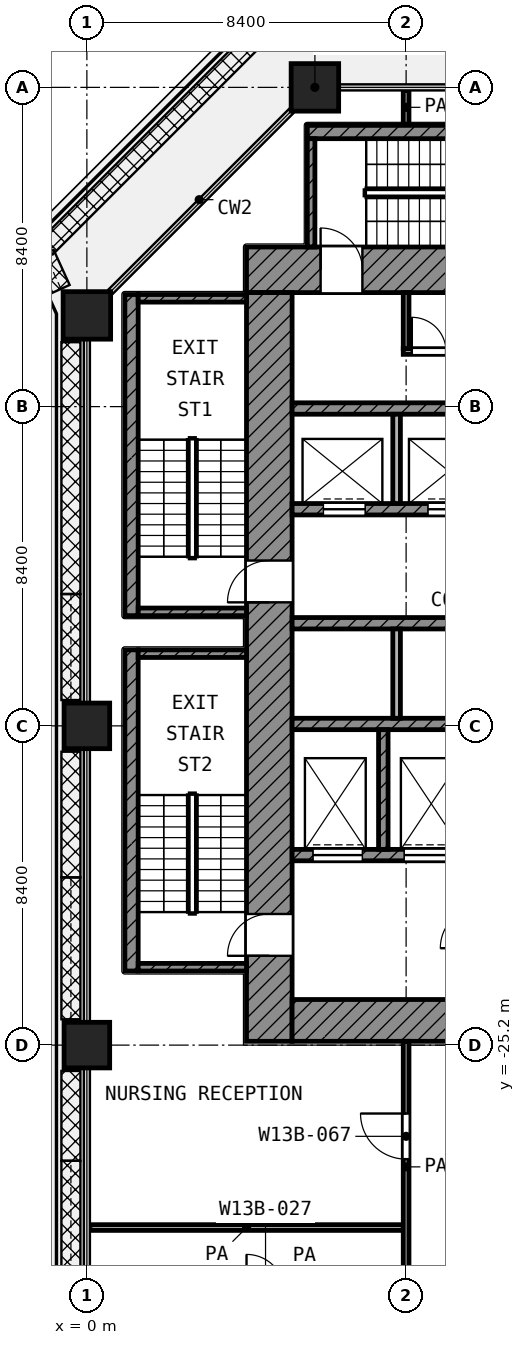
"""IFC4 building model, lengths in metres.
Left out: names, types, materials, properties, quantities, classifications, styles, units other than length and angle.
Written with IfcOpenShell. Run it as: python <this file> out.ifc"""

import sys

from ifc_helpers import new_model, si_unit, direction, frame, frame_2d, origin, origin_2d, place, context, subcontext, project, spatial, rectangle, extrude, element, fill, save


model = new_model("IFC4")
c1 = context("Model", 3, precision=1e-05, world=origin(), true_north=direction((0.0, 1.0)))
c2 = subcontext(c1, "Body", "Model", "MODEL_VIEW")
j1 = project(units=[si_unit("LENGTHUNIT", "METRE"), si_unit("PLANEANGLEUNIT", "RADIAN")], contexts=[c1])
p1 = place(None, origin())
s1 = spatial("IfcSite", under=j1, at=p1, CompositionType="ELEMENT")
p2 = place(p1, origin())
s2 = spatial("IfcBuilding", under=s1, at=p2, CompositionType="ELEMENT")
p3 = place(p2, frame((0.0, 0.0, 89.6)))
s3 = spatial("IfcBuildingStorey", under=s2, at=p3, CompositionType="ELEMENT", Elevation=89.6)
for number, where, z_axis, x_axis in (
    (1, (6.0, 0.0, 0.0), (0.0, 0.0, 1.0), (1.0, 0.0, 0.0)),
    (2, (0.0, -6.0, 0.0), (0.0, 0.0, 1.0), (1.0, 0.0, 0.0)),
):
    element("IfcColumn", number, at=place(p3, frame(where, z_axis=z_axis, x_axis=x_axis)), inside=s3, PredefinedType="COLUMN", context=c2, shape_type="SweptSolid", body=[
        extrude(rectangle(XDim=1.25, YDim=1.25, at=origin_2d()), origin(), (0.0, 0.0, 1.0), 4.2),
    ])
for number, where, z_axis, x_axis in (
    (3, (0.0, -16.8, 0.0), (0.0, 0.0, 1.0), (1.0, 0.0, 0.0)),
    (4, (0.0, -25.2, 0.0), (0.0, 0.0, 1.0), (1.0, 0.0, 0.0)),
):
    element("IfcColumn", number, at=place(p3, frame(where, z_axis=z_axis, x_axis=x_axis)), inside=s3, PredefinedType="COLUMN", context=c2, shape_type="SweptSolid", body=[
        extrude(rectangle(XDim=1.2, YDim=1.2, at=origin_2d()), origin(), (0.0, 0.0, 1.0), 4.2),
    ])
p4 = place(p3, frame((4.2, -4.8, 0.0), z_axis=(0.0, 0.0, 1.0), x_axis=(1.0, 0.0, 0.0)))
e5 = element("IfcWall", 5, at=p4, inside=s3, PredefinedType="SHEAR", context=c2, shape_type="SweptSolid", body=[
    extrude(rectangle(XDim=20.9, YDim=1.2, at=frame_2d((10.45, 0.0))), origin(), (0.0, 0.0, 1.0), 3.7),
])
p5 = place(p4, frame((1.95, 0.0, 0.0)))
e6 = element("IfcOpeningElement", 6, at=p5, cuts=e5, PredefinedType="OPENING", context=c2, shape_type="SweptSolid", body=[
    extrude(rectangle(XDim=1.1, YDim=2.1, at=frame_2d((0.55, 1.05))), frame((0.0, 0.61, 0.0), z_axis=(0.0, -1.0, 0.0), x_axis=(1.0, 0.0, 0.0)), (0.0, 0.0, 1.0), 1.22),
])
p6 = place(p4, frame((17.95, 0.0, 0.0)))
e7 = element("IfcOpeningElement", 7, at=p6, cuts=e5, PredefinedType="OPENING", context=c2, shape_type="SweptSolid", body=[
    extrude(rectangle(XDim=1.1, YDim=2.1, at=frame_2d((0.55, 1.05))), frame((0.0, 0.61, 0.0), z_axis=(0.0, -1.0, 0.0), x_axis=(1.0, 0.0, 0.0)), (0.0, 0.0, 1.0), 1.22),
])
p7 = place(p3, frame((4.8, -25.1, 0.0), z_axis=(0.0, 0.0, 1.0), x_axis=(0.0, 1.0, 0.0)))
e8 = element("IfcWall", 8, at=p7, inside=s3, PredefinedType="SHEAR", context=c2, shape_type="SweptSolid", body=[
    extrude(rectangle(XDim=19.7, YDim=1.2, at=frame_2d((9.85, 0.0))), origin(), (0.0, 0.0, 1.0), 3.7),
])
p8 = place(p7, frame((11.55, 0.0, 0.0)))
e9 = element("IfcOpeningElement", 9, at=p8, cuts=e8, PredefinedType="OPENING", context=c2, shape_type="SweptSolid", body=[
    extrude(rectangle(XDim=1.1, YDim=2.1, at=frame_2d((0.55, 1.05))), frame((0.0, 0.61, 0.0), z_axis=(0.0, -1.0, 0.0), x_axis=(1.0, 0.0, 0.0)), (0.0, 0.0, 1.0), 1.22),
])
p9 = place(p7, frame((2.25, 0.0, 0.0)))
e10 = element("IfcOpeningElement", 10, at=p9, cuts=e8, PredefinedType="OPENING", context=c2, shape_type="SweptSolid", body=[
    extrude(rectangle(XDim=1.1, YDim=2.1, at=frame_2d((0.55, 1.05))), frame((0.0, 0.61, 0.0), z_axis=(0.0, -1.0, 0.0), x_axis=(1.0, 0.0, 0.0)), (0.0, 0.0, 1.0), 1.22),
])
p10 = place(p3, frame((5.4, -24.55, 0.0), z_axis=(0.0, 0.0, 1.0), x_axis=(1.0, 0.0, 0.0)))
e11 = element("IfcWall", 11, at=p10, inside=s3, PredefinedType="SHEAR", context=c2, shape_type="SweptSolid", body=[
    extrude(rectangle(XDim=18.6, YDim=1.1, at=frame_2d((9.3, 0.0))), origin(), (0.0, 0.0, 1.0), 3.7),
])
p11 = place(p10, frame((6.3, 0.0, 0.0)))
e12 = element("IfcOpeningElement", 12, at=p11, cuts=e11, PredefinedType="OPENING", context=c2, shape_type="SweptSolid", body=[
    extrude(rectangle(XDim=1.8, YDim=2.1, at=frame_2d((0.9, 1.05))), frame((0.0, 0.56, 0.0), z_axis=(0.0, -1.0, 0.0), x_axis=(1.0, 0.0, 0.0)), (0.0, 0.0, 1.0), 1.12),
])
p12 = place(p3, frame((5.4, -8.45, 0.0), z_axis=(0.0, 0.0, 1.0), x_axis=(1.0, 0.0, 0.0)))
e13 = element("IfcWall", 13, at=p12, inside=s3, PredefinedType="SHEAR", context=c2, shape_type="SweptSolid", body=[
    extrude(rectangle(XDim=16.65, YDim=0.3, at=frame_2d((8.325, 0.0))), origin(), (0.0, 0.0, 1.0), 3.7),
])
p13 = place(p3, frame((5.4, -11.1, 0.0), z_axis=(0.0, 0.0, 1.0), x_axis=(1.0, 0.0, 0.0)))
e14 = element("IfcWall", 14, at=p13, inside=s3, PredefinedType="SHEAR", context=c2, shape_type="SweptSolid", body=[
    extrude(rectangle(XDim=16.65, YDim=0.3, at=frame_2d((8.325, 0.0))), origin(), (0.0, 0.0, 1.0), 3.7),
])
p14 = place(p13, frame((0.825, 0.0, 0.0)))
e15 = element("IfcOpeningElement", 15, at=p14, cuts=e14, PredefinedType="OPENING", context=c2, shape_type="SweptSolid", body=[
    extrude(rectangle(XDim=1.1, YDim=2.1, at=frame_2d((0.55, 1.05))), frame((0.0, 0.16, 0.0), z_axis=(0.0, -1.0, 0.0), x_axis=(1.0, 0.0, 0.0)), (0.0, 0.0, 1.0), 0.32),
])
p15 = place(p13, frame((3.575, 0.0, 0.0)))
e16 = element("IfcOpeningElement", 16, at=p15, cuts=e14, PredefinedType="OPENING", context=c2, shape_type="SweptSolid", body=[
    extrude(rectangle(XDim=1.1, YDim=2.1, at=frame_2d((0.55, 1.05))), frame((0.0, 0.16, 0.0), z_axis=(0.0, -1.0, 0.0), x_axis=(1.0, 0.0, 0.0)), (0.0, 0.0, 1.0), 0.32),
])
p16 = place(p13, frame((6.325, 0.0, 0.0)))
e17 = element("IfcOpeningElement", 17, at=p16, cuts=e14, PredefinedType="OPENING", context=c2, shape_type="SweptSolid", body=[
    extrude(rectangle(XDim=1.1, YDim=2.1, at=frame_2d((0.55, 1.05))), frame((0.0, 0.16, 0.0), z_axis=(0.0, -1.0, 0.0), x_axis=(1.0, 0.0, 0.0)), (0.0, 0.0, 1.0), 0.32),
])
p17 = place(p13, frame((9.075, 0.0, 0.0)))
e18 = element("IfcOpeningElement", 18, at=p17, cuts=e14, PredefinedType="OPENING", context=c2, shape_type="SweptSolid", body=[
    extrude(rectangle(XDim=1.1, YDim=2.1, at=frame_2d((0.55, 1.05))), frame((0.0, 0.16, 0.0), z_axis=(0.0, -1.0, 0.0), x_axis=(1.0, 0.0, 0.0)), (0.0, 0.0, 1.0), 0.32),
])
for number, where, z_axis, x_axis in (
    (19, (5.4, -14.1, 0.0), (0.0, 0.0, 1.0), (1.0, 0.0, 0.0)),
    (20, (5.4, -16.75, 0.0), (0.0, 0.0, 1.0), (1.0, 0.0, 0.0)),
):
    element("IfcWall", number, at=place(p3, frame(where, z_axis=z_axis, x_axis=x_axis)), inside=s3, PredefinedType="SHEAR", context=c2, shape_type="SweptSolid", body=[
        extrude(rectangle(XDim=16.65, YDim=0.3, at=frame_2d((8.325, 0.0))), origin(), (0.0, 0.0, 1.0), 3.7),
    ])
p18 = place(p3, frame((5.4, -20.2, 0.0), z_axis=(0.0, 0.0, 1.0), x_axis=(1.0, 0.0, 0.0)))
e21 = element("IfcWall", 21, at=p18, inside=s3, PredefinedType="SHEAR", context=c2, shape_type="SweptSolid", body=[
    extrude(rectangle(XDim=14.65, YDim=0.3, at=frame_2d((7.325, 0.0))), origin(), (0.0, 0.0, 1.0), 3.7),
])
p19 = place(p18, frame((10.55, 0.0, 0.0)))
e22 = element("IfcOpeningElement", 22, at=p19, cuts=e21, PredefinedType="OPENING", context=c2, shape_type="SweptSolid", body=[
    extrude(rectangle(XDim=1.3, YDim=2.1, at=frame_2d((0.65, 1.05))), frame((0.0, 0.16, 0.0), z_axis=(0.0, -1.0, 0.0), x_axis=(1.0, 0.0, 0.0)), (0.0, 0.0, 1.0), 0.32),
])
p20 = place(p18, frame((12.95, 0.0, 0.0)))
e23 = element("IfcOpeningElement", 23, at=p20, cuts=e21, PredefinedType="OPENING", context=c2, shape_type="SweptSolid", body=[
    extrude(rectangle(XDim=1.3, YDim=2.1, at=frame_2d((0.65, 1.05))), frame((0.0, 0.16, 0.0), z_axis=(0.0, -1.0, 0.0), x_axis=(1.0, 0.0, 0.0)), (0.0, 0.0, 1.0), 0.32),
])
p21 = place(p18, frame((0.55, 0.0, 0.0)))
e24 = element("IfcOpeningElement", 24, at=p21, cuts=e21, PredefinedType="OPENING", context=c2, shape_type="SweptSolid", body=[
    extrude(rectangle(XDim=1.3, YDim=2.1, at=frame_2d((0.65, 1.05))), frame((0.0, 0.16, 0.0), z_axis=(0.0, -1.0, 0.0), x_axis=(1.0, 0.0, 0.0)), (0.0, 0.0, 1.0), 0.32),
])
p22 = place(p18, frame((2.95, 0.0, 0.0)))
e25 = element("IfcOpeningElement", 25, at=p22, cuts=e21, PredefinedType="OPENING", context=c2, shape_type="SweptSolid", body=[
    extrude(rectangle(XDim=1.3, YDim=2.1, at=frame_2d((0.65, 1.05))), frame((0.0, 0.16, 0.0), z_axis=(0.0, -1.0, 0.0), x_axis=(1.0, 0.0, 0.0)), (0.0, 0.0, 1.0), 0.32),
])
p23 = place(p18, frame((5.95, 0.0, 0.0)))
e26 = element("IfcOpeningElement", 26, at=p23, cuts=e21, PredefinedType="OPENING", context=c2, shape_type="SweptSolid", body=[
    extrude(rectangle(XDim=0.9, YDim=2.1, at=frame_2d((0.45, 1.05))), frame((0.0, 0.16, 0.0), z_axis=(0.0, -1.0, 0.0), x_axis=(1.0, 0.0, 0.0)), (0.0, 0.0, 1.0), 0.32),
])
p24 = place(p18, frame((8.35, 0.0, 0.0)))
e27 = element("IfcOpeningElement", 27, at=p24, cuts=e21, PredefinedType="OPENING", context=c2, shape_type="SweptSolid", body=[
    extrude(rectangle(XDim=0.9, YDim=2.1, at=frame_2d((0.45, 1.05))), frame((0.0, 0.16, 0.0), z_axis=(0.0, -1.0, 0.0), x_axis=(1.0, 0.0, 0.0)), (0.0, 0.0, 1.0), 0.32),
])
p25 = place(p3, frame((7.8, -20.05, 0.0), z_axis=(0.0, 0.0, 1.0), x_axis=(0.0, 1.0, 0.0)))
e28 = element("IfcWall", 28, at=p25, inside=s3, PredefinedType="SHEAR", context=c2, shape_type="SweptSolid", body=[
    extrude(rectangle(XDim=3.15, YDim=0.25, at=frame_2d((1.575, 0.0))), origin(), (0.0, 0.0, 1.0), 3.7),
])
p26 = place(p3, frame((8.15, -10.95, 0.0), z_axis=(0.0, 0.0, 1.0), x_axis=(0.0, 1.0, 0.0)))
e29 = element("IfcWall", 29, at=p26, inside=s3, PredefinedType="PARTITIONING", context=c2, shape_type="SweptSolid", body=[
    extrude(rectangle(XDim=2.35, YDim=0.2, at=frame_2d((1.175, 0.0))), origin(), (0.0, 0.0, 1.0), 3.7),
])
p27 = place(p3, frame((8.15, -16.6, 0.0), z_axis=(0.0, 0.0, 1.0), x_axis=(0.0, 1.0, 0.0)))
e30 = element("IfcWall", 30, at=p27, inside=s3, PredefinedType="PARTITIONING", context=c2, shape_type="SweptSolid", body=[
    extrude(rectangle(XDim=2.35, YDim=0.2, at=frame_2d((1.175, 0.0))), origin(), (0.0, 0.0, 1.0), 3.7),
])
p28 = place(p3, frame((8.325, -6.95, 0.0), z_axis=(0.0, 0.0, 1.0), x_axis=(1.0, 0.0, 0.0)))
e31 = element("IfcWall", 31, at=p28, inside=s3, PredefinedType="PARTITIONING", context=c2, shape_type="SweptSolid", body=[
    extrude(rectangle(XDim=12.75, YDim=0.15, at=frame_2d((6.375, 0.0))), origin(), (0.0, 0.0, 1.0), 3.7),
])
p29 = place(p28, frame((0.225, 0.0, 0.0)))
e32 = element("IfcOpeningElement", 32, at=p29, cuts=e31, PredefinedType="OPENING", context=c2, shape_type="SweptSolid", body=[
    extrude(rectangle(XDim=0.9, YDim=2.1, at=frame_2d((0.45, 1.05))), frame((0.0, 0.085, 0.0), z_axis=(0.0, -1.0, 0.0), x_axis=(1.0, 0.0, 0.0)), (0.0, 0.0, 1.0), 0.17),
])
p30 = place(p28, frame((2.025, 0.0, 0.0)))
e33 = element("IfcOpeningElement", 33, at=p30, cuts=e31, PredefinedType="OPENING", context=c2, shape_type="SweptSolid", body=[
    extrude(rectangle(XDim=0.9, YDim=2.1, at=frame_2d((0.45, 1.05))), frame((0.0, 0.085, 0.0), z_axis=(0.0, -1.0, 0.0), x_axis=(1.0, 0.0, 0.0)), (0.0, 0.0, 1.0), 0.17),
])
p31 = place(p28, frame((4.125, 0.0, 0.0)))
e34 = element("IfcOpeningElement", 34, at=p31, cuts=e31, PredefinedType="OPENING", context=c2, shape_type="SweptSolid", body=[
    extrude(rectangle(XDim=0.9, YDim=2.1, at=frame_2d((0.45, 1.05))), frame((0.0, 0.085, 0.0), z_axis=(0.0, -1.0, 0.0), x_axis=(1.0, 0.0, 0.0)), (0.0, 0.0, 1.0), 0.17),
])
p32 = place(p28, frame((5.625, 0.0, 0.0)))
e35 = element("IfcOpeningElement", 35, at=p32, cuts=e31, PredefinedType="OPENING", context=c2, shape_type="SweptSolid", body=[
    extrude(rectangle(XDim=0.9, YDim=2.1, at=frame_2d((0.45, 1.05))), frame((0.0, 0.085, 0.0), z_axis=(0.0, -1.0, 0.0), x_axis=(1.0, 0.0, 0.0)), (0.0, 0.0, 1.0), 0.17),
])
p33 = place(p28, frame((7.425, 0.0, 0.0)))
e36 = element("IfcOpeningElement", 36, at=p33, cuts=e31, PredefinedType="OPENING", context=c2, shape_type="SweptSolid", body=[
    extrude(rectangle(XDim=0.9, YDim=2.1, at=frame_2d((0.45, 1.05))), frame((0.0, 0.085, 0.0), z_axis=(0.0, -1.0, 0.0), x_axis=(1.0, 0.0, 0.0)), (0.0, 0.0, 1.0), 0.17),
])
p34 = place(p28, frame((9.225, 0.0, 0.0)))
e37 = element("IfcOpeningElement", 37, at=p34, cuts=e31, PredefinedType="OPENING", context=c2, shape_type="SweptSolid", body=[
    extrude(rectangle(XDim=0.9, YDim=2.1, at=frame_2d((0.45, 1.05))), frame((0.0, 0.085, 0.0), z_axis=(0.0, -1.0, 0.0), x_axis=(1.0, 0.0, 0.0)), (0.0, 0.0, 1.0), 0.17),
])
p35 = place(p28, frame((11.025, 0.0, 0.0)))
e38 = element("IfcOpeningElement", 38, at=p35, cuts=e31, PredefinedType="OPENING", context=c2, shape_type="SweptSolid", body=[
    extrude(rectangle(XDim=0.9, YDim=2.1, at=frame_2d((0.45, 1.05))), frame((0.0, 0.085, 0.0), z_axis=(0.0, -1.0, 0.0), x_axis=(1.0, 0.0, 0.0)), (0.0, 0.0, 1.0), 0.17),
])
p36 = place(p3, frame((8.4, -6.875, 0.0), z_axis=(0.0, 0.0, 1.0), x_axis=(0.0, 1.0, 0.0)))
e39 = element("IfcWall", 39, at=p36, inside=s3, PredefinedType="PARTITIONING", context=c2, shape_type="SweptSolid", body=[
    extrude(rectangle(XDim=1.475, YDim=0.15, at=frame_2d((0.738, 0.0))), origin(), (0.0, 0.0, 1.0), 3.7),
])
p37 = place(p3, frame((1.175, -13.9, 0.0), z_axis=(0.0, 0.0, 1.0), x_axis=(0.0, 1.0, 0.0)))
e40 = element("IfcWall", 40, at=p37, inside=s3, PredefinedType="SHEAR", context=c2, shape_type="SweptSolid", body=[
    extrude(rectangle(XDim=8.45, YDim=0.35, at=frame_2d((4.225, 0.0))), origin(), (0.0, 0.0, 1.0), 3.7),
])
for number, where, z_axis, x_axis in (
    (41, (1.35, -5.55, 0.0), (0.0, 0.0, 1.0), (1.0, 0.0, 0.0)),
    (42, (1.35, -13.8, 0.0), (0.0, 0.0, 1.0), (1.0, 0.0, 0.0)),
):
    element("IfcWall", number, at=place(p3, frame(where, z_axis=z_axis, x_axis=x_axis)), inside=s3, PredefinedType="SHEAR", context=c2, shape_type="SweptSolid", body=[
        extrude(rectangle(XDim=2.85, YDim=0.2, at=frame_2d((1.425, 0.0))), origin(), (0.0, 0.0, 1.0), 3.7),
    ])
p38 = place(p3, frame((1.175, -23.25, 0.0), z_axis=(0.0, 0.0, 1.0), x_axis=(0.0, 1.0, 0.0)))
e43 = element("IfcWall", 43, at=p38, inside=s3, PredefinedType="SHEAR", context=c2, shape_type="SweptSolid", body=[
    extrude(rectangle(XDim=8.45, YDim=0.35, at=frame_2d((4.225, 0.0))), origin(), (0.0, 0.0, 1.0), 3.7),
])
for number, where, z_axis, x_axis in (
    (44, (1.35, -14.9, 0.0), (0.0, 0.0, 1.0), (1.0, 0.0, 0.0)),
    (45, (1.35, -23.15, 0.0), (0.0, 0.0, 1.0), (1.0, 0.0, 0.0)),
):
    element("IfcWall", number, at=place(p3, frame(where, z_axis=z_axis, x_axis=x_axis)), inside=s3, PredefinedType="SHEAR", context=c2, shape_type="SweptSolid", body=[
        extrude(rectangle(XDim=2.85, YDim=0.2, at=frame_2d((1.425, 0.0))), origin(), (0.0, 0.0, 1.0), 3.7),
    ])
p39 = place(p3, frame((5.8, -1.175, 0.0), z_axis=(0.0, 0.0, 1.0), x_axis=(1.0, 0.0, 0.0)))
e46 = element("IfcWall", 46, at=p39, inside=s3, PredefinedType="SHEAR", context=c2, shape_type="SweptSolid", body=[
    extrude(rectangle(XDim=8.45, YDim=0.35, at=frame_2d((4.225, 0.0))), origin(), (0.0, 0.0, 1.0), 3.7),
])
p40 = place(p3, frame((5.9, -4.2, 0.0), z_axis=(0.0, 0.0, 1.0), x_axis=(0.0, 1.0, 0.0)))
e47 = element("IfcWall", 47, at=p40, inside=s3, PredefinedType="SHEAR", context=c2, shape_type="SweptSolid", body=[
    extrude(rectangle(XDim=2.85, YDim=0.2, at=frame_2d((1.425, 0.0))), origin(), (0.0, 0.0, 1.0), 3.7),
])
p41 = place(p3, frame((0.08, -30.0, 0.0), z_axis=(0.0, 0.0, 1.0), x_axis=(1.0, 0.0, 0.0)))
e48 = element("IfcWall", 48, at=p41, inside=s3, PredefinedType="PARTITIONING", context=c2, shape_type="SweptSolid", body=[
    extrude(rectangle(XDim=8.245, YDim=0.15, at=frame_2d((4.123, 0.0))), origin(), (0.0, 0.0, 1.0), 3.7),
])
p42 = place(p3, frame((8.4, -31.707, 0.0), z_axis=(0.0, 0.0, 1.0), x_axis=(0.0, 1.0, 0.0)))
e49 = element("IfcWall", 49, at=p42, inside=s3, PredefinedType="PARTITIONING", context=c2, shape_type="SweptSolid", body=[
    extrude(rectangle(XDim=6.607, YDim=0.15, at=frame_2d((3.303, 0.0))), origin(), (0.0, 0.0, 1.0), 3.7),
])
p43 = place(p42, frame((3.507, 0.0, 0.0)))
e50 = element("IfcOpeningElement", 50, at=p43, cuts=e49, PredefinedType="OPENING", context=c2, shape_type="SweptSolid", body=[
    extrude(rectangle(XDim=1.2, YDim=2.1, at=frame_2d((0.6, 1.05))), frame((0.0, 0.085, 0.0), z_axis=(0.0, -1.0, 0.0), x_axis=(1.0, 0.0, 0.0)), (0.0, 0.0, 1.0), 0.17),
])
p44 = place(p3, frame((8.4, -0.97, 0.0), z_axis=(0.0, 0.0, 1.0), x_axis=(0.0, 1.0, 0.0)))
e51 = element("IfcWall", 51, at=p44, inside=s3, PredefinedType="PARTITIONING", context=c2, shape_type="SweptSolid", body=[
    extrude(rectangle(XDim=0.89, YDim=0.15, at=frame_2d((0.445, 0.0))), origin(), (0.0, 0.0, 1.0), 3.7),
])
p45 = place(p14, origin())
e52 = element("IfcDoor", 52, at=p45, inside=s3, OperationType="DOUBLE_DOOR_SLIDING", PredefinedType="DOOR", context=c2, shape_type="SweptSolid", body=[
    extrude(rectangle(XDim=1.1, YDim=2.1, at=frame_2d((0.55, 1.05))), frame((0.0, 0.025, 0.0), z_axis=(0.0, -1.0, 0.0), x_axis=(1.0, 0.0, 0.0)), (0.0, 0.0, 1.0), 0.05),
])
fill(e15, e52)
p46 = place(p15, origin())
e53 = element("IfcDoor", 53, at=p46, inside=s3, OperationType="DOUBLE_DOOR_SLIDING", PredefinedType="DOOR", context=c2, shape_type="SweptSolid", body=[
    extrude(rectangle(XDim=1.1, YDim=2.1, at=frame_2d((0.55, 1.05))), frame((0.0, 0.025, 0.0), z_axis=(0.0, -1.0, 0.0), x_axis=(1.0, 0.0, 0.0)), (0.0, 0.0, 1.0), 0.05),
])
fill(e16, e53)
p47 = place(p21, origin())
e54 = element("IfcDoor", 54, at=p47, inside=s3, OperationType="DOUBLE_DOOR_SLIDING", PredefinedType="DOOR", context=c2, shape_type="SweptSolid", body=[
    extrude(rectangle(XDim=1.3, YDim=2.1, at=frame_2d((0.65, 1.05))), frame((0.0, 0.025, 0.0), z_axis=(0.0, -1.0, 0.0), x_axis=(1.0, 0.0, 0.0)), (0.0, 0.0, 1.0), 0.05),
])
fill(e24, e54)
p48 = place(p22, origin())
e55 = element("IfcDoor", 55, at=p48, inside=s3, OperationType="DOUBLE_DOOR_SLIDING", PredefinedType="DOOR", context=c2, shape_type="SweptSolid", body=[
    extrude(rectangle(XDim=1.3, YDim=2.1, at=frame_2d((0.65, 1.05))), frame((0.0, 0.025, 0.0), z_axis=(0.0, -1.0, 0.0), x_axis=(1.0, 0.0, 0.0)), (0.0, 0.0, 1.0), 0.05),
])
fill(e25, e55)
p49 = place(p8, origin())
e56 = element("IfcDoor", 56, at=p49, inside=s3, OperationType="SINGLE_SWING_LEFT", PredefinedType="DOOR", context=c2, shape_type="SweptSolid", body=[
    extrude(rectangle(XDim=1.1, YDim=2.1, at=frame_2d((0.55, 1.05))), frame((0.0, 0.025, 0.0), z_axis=(0.0, -1.0, 0.0), x_axis=(1.0, 0.0, 0.0)), (0.0, 0.0, 1.0), 0.05),
])
fill(e9, e56)
p50 = place(p9, origin())
e57 = element("IfcDoor", 57, at=p50, inside=s3, OperationType="SINGLE_SWING_LEFT", PredefinedType="DOOR", context=c2, shape_type="SweptSolid", body=[
    extrude(rectangle(XDim=1.1, YDim=2.1, at=frame_2d((0.55, 1.05))), frame((0.0, 0.025, 0.0), z_axis=(0.0, -1.0, 0.0), x_axis=(1.0, 0.0, 0.0)), (0.0, 0.0, 1.0), 0.05),
])
fill(e10, e57)
p51 = place(p5, origin())
e58 = element("IfcDoor", 58, at=p51, inside=s3, OperationType="SINGLE_SWING_LEFT", PredefinedType="DOOR", context=c2, shape_type="SweptSolid", body=[
    extrude(rectangle(XDim=1.1, YDim=2.1, at=frame_2d((0.55, 1.05))), frame((0.0, 0.025, 0.0), z_axis=(0.0, -1.0, 0.0), x_axis=(1.0, 0.0, 0.0)), (0.0, 0.0, 1.0), 0.05),
])
fill(e6, e58)
p52 = place(p29, origin())
e59 = element("IfcDoor", 59, at=p52, inside=s3, OperationType="SINGLE_SWING_LEFT", PredefinedType="DOOR", context=c2, shape_type="SweptSolid", body=[
    extrude(rectangle(XDim=0.9, YDim=2.1, at=frame_2d((0.45, 1.05))), frame((0.0, 0.025, 0.0), z_axis=(0.0, -1.0, 0.0), x_axis=(1.0, 0.0, 0.0)), (0.0, 0.0, 1.0), 0.05),
])
fill(e32, e59)
p53 = place(p43, origin())
e60 = element("IfcDoor", 60, at=p53, inside=s3, OperationType="SINGLE_SWING_RIGHT", PredefinedType="DOOR", context=c2, shape_type="SweptSolid", body=[
    extrude(rectangle(XDim=1.2, YDim=2.1, at=frame_2d((0.6, 1.05))), frame((0.0, 0.025, 0.0), z_axis=(0.0, -1.0, 0.0), x_axis=(1.0, 0.0, 0.0)), (0.0, 0.0, 1.0), 0.05),
])
fill(e50, e60)
save(model, sys.argv[1])
